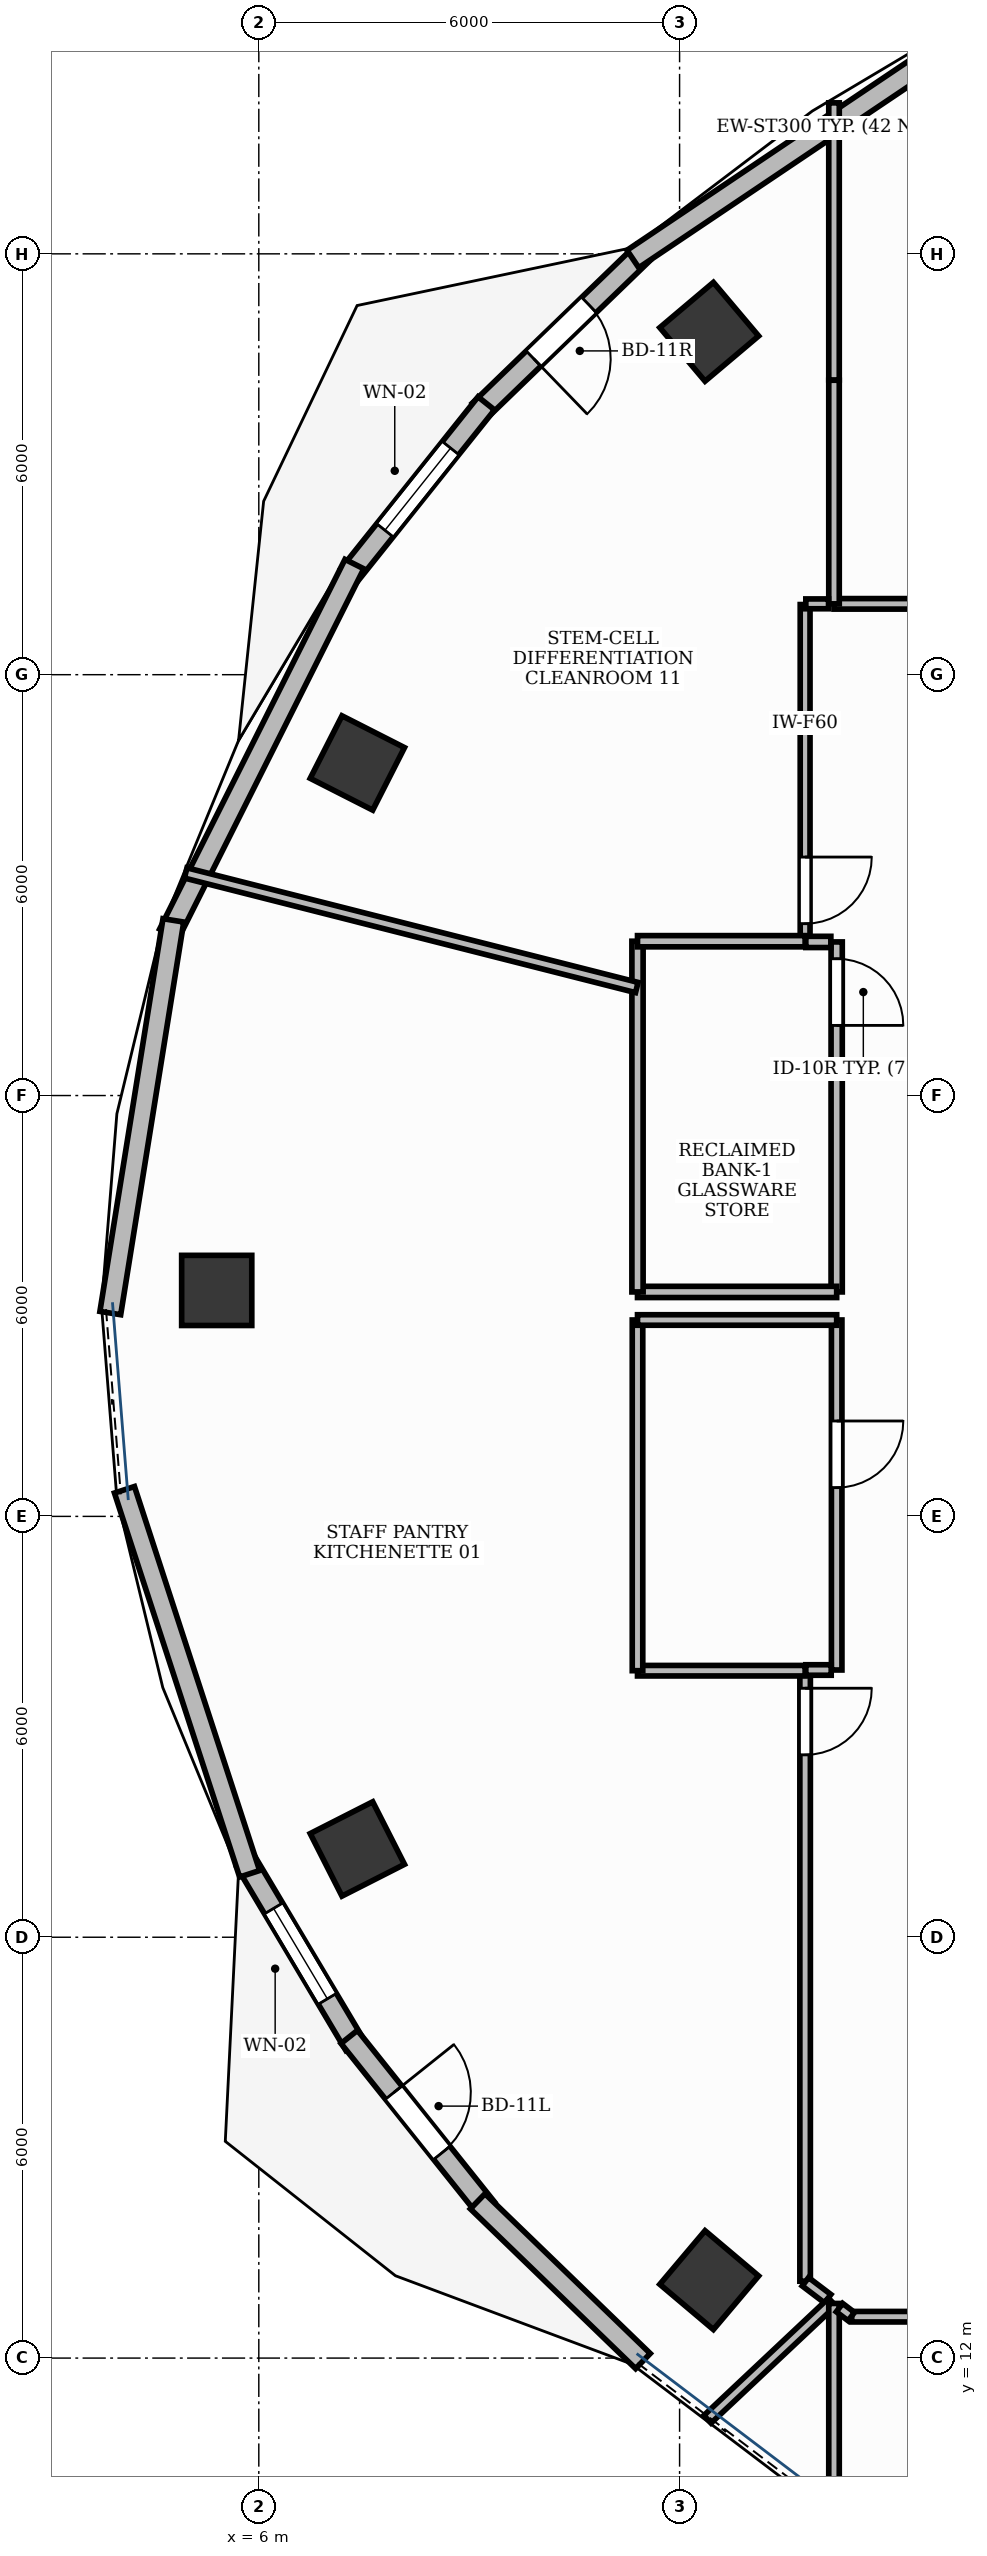
"""IFC4 building model, lengths in metres.
Left out: names, types, materials, properties, quantities, classifications, styles, units other than length and angle.
Written with IfcOpenShell. Run it as: python <this file> out.ifc"""

import sys

from ifc_helpers import new_model, si_unit, direction, frame, frame_2d, origin, origin_2d, place, context, subcontext, project, spatial, rectangle, extrude, element, fill, save


model = new_model("IFC4")
c1 = context("Model", 3, precision=1e-05, world=origin(), true_north=direction((0.0, 1.0)))
c2 = subcontext(c1, "Body", "Model", "MODEL_VIEW")
j1 = project(units=[si_unit("LENGTHUNIT", "METRE"), si_unit("PLANEANGLEUNIT", "RADIAN")], contexts=[c1])
p1 = place(None, origin())
s1 = spatial("IfcSite", under=j1, at=p1, CompositionType="ELEMENT")
p2 = place(p1, origin())
s2 = spatial("IfcBuilding", under=s1, at=p2, CompositionType="ELEMENT")
p3 = place(p2, frame((0.0, 0.0, 235.2)))
s3 = spatial("IfcBuildingStorey", under=s2, at=p3, CompositionType="ELEMENT", Elevation=235.2)
for number, where, z_axis, x_axis in (
    (1, (12.423, 40.889, -0.0), (0.0, 0.0, 1.0), (0.764, 0.645, 0.0)),
    (2, (7.405, 34.741, -0.0), (0.0, 0.0, 1.0), (0.453, 0.891, 0.0)),
    (3, (5.4, 27.222, -0.0), (0.0, 0.0, 1.0), (0.0, 1.0, 0.0)),
    (4, (7.405, 19.259, -0.0), (0.0, 0.0, 1.0), (-0.453, 0.891, 0.0)),
    (5, (12.423, 13.111, -0.0), (0.0, 0.0, 1.0), (-0.764, 0.645, 0.0)),
):
    element("IfcColumn", number, at=place(p3, frame(where, z_axis=z_axis, x_axis=x_axis)), inside=s3, PredefinedType="COLUMN", context=c2, shape_type="SweptSolid", body=[
        extrude(rectangle(XDim=1.0, YDim=1.0, at=origin_2d()), origin(), (0.0, 0.0, 1.0), 3.901),
    ])
p4 = place(p3, frame((11.477, 42.014, 0.0), z_axis=(0.0, 0.0, 1.0), x_axis=(-0.718959481813, -0.695051986194, 0.0)))
e6 = element("IfcWall", 6, at=p4, inside=s3, PredefinedType="STANDARD", context=c2, shape_type="SweptSolid", body=[
    extrude(rectangle(XDim=3.237, YDim=0.3, at=frame_2d((1.619, 0.0))), origin(), (0.0, 0.0, 1.0), 3.9),
])
p5 = place(p4, frame((1.069, 0.0, 0.0)))
e7 = element("IfcOpeningElement", 7, at=p5, cuts=e6, PredefinedType="OPENING", context=c2, shape_type="SweptSolid", body=[
    extrude(rectangle(XDim=1.1, YDim=2.15, at=frame_2d((0.55, 1.075))), frame((0.0, 0.165, 0.0), z_axis=(0.0, -1.0, 0.0), x_axis=(1.0, 0.0, 0.0)), (0.0, 0.0, 1.0), 0.33),
])
p6 = place(p3, frame((9.244, 39.868, 0.0), z_axis=(0.0, 0.0, 1.0), x_axis=(-0.624095877763, -0.781347768512, 0.0)))
e8 = element("IfcWall", 8, at=p6, inside=s3, PredefinedType="STANDARD", context=c2, shape_type="SweptSolid", body=[
    extrude(rectangle(XDim=3.132, YDim=0.3, at=frame_2d((1.566, 0.0))), origin(), (0.0, 0.0, 1.0), 3.9),
])
p7 = place(p6, frame((0.816, 0.0, 0.95)))
e9 = element("IfcOpeningElement", 9, at=p7, cuts=e8, PredefinedType="OPENING", context=c2, shape_type="SweptSolid", body=[
    extrude(rectangle(XDim=1.5, YDim=1.8, at=frame_2d((0.75, 0.9))), frame((0.0, 0.165, 0.0), z_axis=(0.0, -1.0, 0.0), x_axis=(1.0, 0.0, 0.0)), (0.0, 0.0, 1.0), 0.33),
])
p8 = place(p3, frame((5.818, 19.071, 0.0), z_axis=(0.0, 0.0, 1.0), x_axis=(0.511263271049, -0.859424148879, 0.0)))
e10 = element("IfcWall", 10, at=p8, inside=s3, PredefinedType="STANDARD", context=c2, shape_type="SweptSolid", body=[
    extrude(rectangle(XDim=3.036, YDim=0.3, at=frame_2d((1.518, 0.0))), origin(), (0.0, 0.0, 1.0), 3.9),
])
p9 = place(p8, frame((0.768, 0.0, 0.95)))
e11 = element("IfcOpeningElement", 11, at=p9, cuts=e10, PredefinedType="OPENING", context=c2, shape_type="SweptSolid", body=[
    extrude(rectangle(XDim=1.5, YDim=1.8, at=frame_2d((0.75, 0.9))), frame((0.0, 0.165, 0.0), z_axis=(0.0, -1.0, 0.0), x_axis=(1.0, 0.0, 0.0)), (0.0, 0.0, 1.0), 0.33),
])
p10 = place(p3, frame((7.29, 16.579, 0.0), z_axis=(0.0, 0.0, 1.0), x_axis=(0.624095877763, -0.781347768512, 0.0)))
e12 = element("IfcWall", 12, at=p10, inside=s3, PredefinedType="STANDARD", context=c2, shape_type="SweptSolid", body=[
    extrude(rectangle(XDim=3.132, YDim=0.3, at=frame_2d((1.566, 0.0))), origin(), (0.0, 0.0, 1.0), 3.9),
])
p11 = place(p10, frame((1.016, 0.0, 0.0)))
e13 = element("IfcOpeningElement", 13, at=p11, cuts=e12, PredefinedType="OPENING", context=c2, shape_type="SweptSolid", body=[
    extrude(rectangle(XDim=1.1, YDim=2.15, at=frame_2d((0.55, 1.075))), frame((0.0, 0.165, 0.0), z_axis=(0.0, -1.0, 0.0), x_axis=(1.0, 0.0, 0.0)), (0.0, 0.0, 1.0), 0.33),
])
p12 = place(p3, frame((16.9, 45.667, 0.0), z_axis=(0.0, 0.0, 1.0), x_axis=(-0.829994558021, -0.557771488743, 0.0)))
e14 = element("IfcWall", 14, at=p12, inside=s3, PredefinedType="STANDARD", context=c2, shape_type="SweptSolid", body=[
    extrude(rectangle(XDim=6.706, YDim=0.3, at=frame_2d((3.353, 0.0))), origin(), (0.0, 0.0, 1.0), 3.9),
])
p13 = place(p3, frame((7.363, 37.577, 0.0), z_axis=(0.0, 0.0, 1.0), x_axis=(-0.448240215972, -0.893913143871, 0.0)))
e15 = element("IfcWall", 15, at=p13, inside=s3, PredefinedType="STANDARD", context=c2, shape_type="SweptSolid", body=[
    extrude(rectangle(XDim=5.896, YDim=0.3, at=frame_2d((2.948, 0.0))), origin(), (0.0, 0.0, 1.0), 3.47),
])
p14 = place(p3, frame((4.782, 32.497, 0.0), z_axis=(0.0, 0.0, 1.0), x_axis=(-0.158573166105, -0.987347229191, 0.0)))
e16 = element("IfcWall", 16, at=p14, inside=s3, PredefinedType="STANDARD", context=c2, shape_type="SweptSolid", body=[
    extrude(rectangle(XDim=5.67, YDim=0.3, at=frame_2d((2.835, 0.0))), origin(), (0.0, 0.0, 1.0), 3.47),
])
p15 = place(p3, frame((4.084, 24.379, 0.0), z_axis=(0.0, 0.0, 1.0), x_axis=(0.309937285623, -0.95075700312, 0.0)))
e17 = element("IfcWall", 17, at=p15, inside=s3, PredefinedType="STANDARD", context=c2, shape_type="SweptSolid", body=[
    extrude(rectangle(XDim=5.758, YDim=0.3, at=frame_2d((2.879, 0.0))), origin(), (0.0, 0.0, 1.0), 3.9),
])
p16 = place(p3, frame((9.121, 14.235, 0.0), z_axis=(0.0, 0.0, 1.0), x_axis=(0.718999544538, -0.695010543052, 0.0)))
e18 = element("IfcWall", 18, at=p16, inside=s3, PredefinedType="STANDARD", context=c2, shape_type="SweptSolid", body=[
    extrude(rectangle(XDim=3.277, YDim=0.3, at=frame_2d((1.639, 0.0))), origin(), (0.0, 0.0, 1.0), 3.9),
])
p17 = place(p3, frame((14.24, 26.8, 0.0), z_axis=(0.0, 0.0, 1.0), x_axis=(0.0, -1.0, 0.0)))
e19 = element("IfcWall", 19, at=p17, inside=s3, PredefinedType="PARTITIONING", context=c2, shape_type="SweptSolid", body=[
    extrude(rectangle(XDim=4.99, YDim=0.15, at=frame_2d((2.495, 0.0))), origin(), (0.0, 0.0, 1.0), 2.91),
])
p18 = place(p17, frame((1.44, 0.0, 0.0)))
e20 = element("IfcOpeningElement", 20, at=p18, cuts=e19, PredefinedType="OPENING", context=c2, shape_type="SweptSolid", body=[
    extrude(rectangle(XDim=0.95, YDim=2.15, at=frame_2d((0.475, 1.075))), frame((0.0, 0.09, 0.0), z_axis=(0.0, -1.0, 0.0), x_axis=(1.0, 0.0, 0.0)), (0.0, 0.0, 1.0), 0.18),
])
p19 = place(p3, frame((14.24, 32.19, 0.0), z_axis=(0.0, 0.0, 1.0), x_axis=(0.0, -1.0, 0.0)))
e21 = element("IfcWall", 21, at=p19, inside=s3, PredefinedType="PARTITIONING", context=c2, shape_type="SweptSolid", body=[
    extrude(rectangle(XDim=4.99, YDim=0.16, at=frame_2d((2.495, 0.0))), origin(), (0.0, 0.0, 1.0), 2.91),
])
p20 = place(p19, frame((0.24, 0.0, 0.0)))
e22 = element("IfcOpeningElement", 22, at=p20, cuts=e21, PredefinedType="OPENING", context=c2, shape_type="SweptSolid", body=[
    extrude(rectangle(XDim=0.95, YDim=2.15, at=frame_2d((0.475, 1.075))), frame((0.0, 0.095, 0.0), z_axis=(0.0, -1.0, 0.0), x_axis=(1.0, 0.0, 0.0)), (0.0, 0.0, 1.0), 0.19),
])
p21 = place(p3, frame((13.79, 21.79, 0.0), z_axis=(0.0, 0.0, 1.0), x_axis=(0.0, -1.0, 0.0)))
e23 = element("IfcWall", 23, at=p21, inside=s3, PredefinedType="PARTITIONING", context=c2, shape_type="SweptSolid", body=[
    extrude(rectangle(XDim=8.694, YDim=0.15, at=frame_2d((4.347, 0.0))), origin(), (0.0, 0.0, 1.0), 2.91),
])
p22 = place(p21, frame((0.24, 0.0, 0.0)))
e24 = element("IfcOpeningElement", 24, at=p22, cuts=e23, PredefinedType="OPENING", context=c2, shape_type="SweptSolid", body=[
    extrude(rectangle(XDim=0.95, YDim=2.15, at=frame_2d((0.475, 1.075))), frame((0.0, 0.09, 0.0), z_axis=(0.0, -1.0, 0.0), x_axis=(1.0, 0.0, 0.0)), (0.0, 0.0, 1.0), 0.18),
])
p23 = place(p3, frame((14.454, 12.59, 0.0), z_axis=(0.0, 0.0, 1.0), x_axis=(1.0, 0.0, 0.0)))
e25 = element("IfcWall", 25, at=p23, inside=s3, PredefinedType="PARTITIONING", context=c2, shape_type="SweptSolid", body=[
    extrude(rectangle(XDim=12.652, YDim=0.15, at=frame_2d((6.326, 0.0))), origin(), (0.0, 0.0, 1.0), 2.91),
])
p24 = place(p23, frame((1.673, 0.0, 0.0)))
e26 = element("IfcOpeningElement", 26, at=p24, cuts=e25, PredefinedType="OPENING", context=c2, shape_type="SweptSolid", body=[
    extrude(rectangle(XDim=0.95, YDim=2.15, at=frame_2d((0.475, 1.075))), frame((0.0, 0.09, 0.0), z_axis=(0.0, -1.0, 0.0), x_axis=(1.0, 0.0, 0.0)), (0.0, 0.0, 1.0), 0.18),
])
p25 = place(p3, frame((13.79, 37.0, 0.0), z_axis=(0.0, 0.0, 1.0), x_axis=(0.0, -1.0, 0.0)))
e27 = element("IfcWall", 27, at=p25, inside=s3, PredefinedType="PARTITIONING", context=c2, shape_type="SweptSolid", body=[
    extrude(rectangle(XDim=4.79, YDim=0.14, at=frame_2d((2.395, 0.0))), origin(), (0.0, 0.0, 1.0), 2.91),
])
p26 = place(p25, frame((3.6, 0.0, 0.0)))
e28 = element("IfcOpeningElement", 28, at=p26, cuts=e27, PredefinedType="OPENING", context=c2, shape_type="SweptSolid", body=[
    extrude(rectangle(XDim=0.95, YDim=2.15, at=frame_2d((0.475, 1.075))), frame((0.0, 0.085, 0.0), z_axis=(0.0, -1.0, 0.0), x_axis=(1.0, 0.0, 0.0)), (0.0, 0.0, 1.0), 0.17),
])
p27 = place(p3, frame((14.162, 21.81, 0.0), z_axis=(0.0, 0.0, 1.0), x_axis=(-1.0, 0.0, 0.0)))
e29 = element("IfcWall", 29, at=p27, inside=s3, PredefinedType="PARTITIONING", context=c2, shape_type="SweptSolid", body=[
    extrude(rectangle(XDim=0.362, YDim=0.15, at=frame_2d((0.181, 0.0))), origin(), (0.0, 0.0, 1.0), 2.91),
])
p28 = place(p3, frame((13.79, 21.8, 0.0), z_axis=(0.0, 0.0, 1.0), x_axis=(-1.0, 0.0, 0.0)))
e30 = element("IfcWall", 30, at=p28, inside=s3, PredefinedType="PARTITIONING", context=c2, shape_type="SweptSolid", body=[
    extrude(rectangle(XDim=2.39, YDim=0.15, at=frame_2d((1.195, 0.0))), origin(), (0.0, 0.0, 1.0), 2.91),
])
p29 = place(p3, frame((11.4, 21.8, 0.0), z_axis=(0.0, 0.0, 1.0), x_axis=(0.0, 1.0, 0.0)))
e31 = element("IfcWall", 31, at=p29, inside=s3, PredefinedType="PARTITIONING", context=c2, shape_type="SweptSolid", body=[
    extrude(rectangle(XDim=5.0, YDim=0.15, at=frame_2d((2.5, 0.0))), origin(), (0.0, 0.0, 1.0), 2.91),
])
p30 = place(p3, frame((11.4, 26.8, 0.0), z_axis=(0.0, 0.0, 1.0), x_axis=(1.0, 0.0, 0.0)))
e32 = element("IfcWall", 32, at=p30, inside=s3, PredefinedType="PARTITIONING", context=c2, shape_type="SweptSolid", body=[
    extrude(rectangle(XDim=2.84, YDim=0.15, at=frame_2d((1.42, 0.0))), origin(), (0.0, 0.0, 1.0), 2.91),
])
p31 = place(p3, frame((13.8, 32.19, 0.0), z_axis=(0.0, 0.0, 1.0), x_axis=(1.0, 0.0, 0.0)))
e33 = element("IfcWall", 33, at=p31, inside=s3, PredefinedType="PARTITIONING", context=c2, shape_type="SweptSolid", body=[
    extrude(rectangle(XDim=0.357, YDim=0.16, at=frame_2d((0.178, 0.0))), origin(), (0.0, 0.0, 1.0), 2.91),
])
p32 = place(p3, frame((14.24, 27.2, 0.0), z_axis=(0.0, 0.0, 1.0), x_axis=(-1.0, 0.0, 0.0)))
e34 = element("IfcWall", 34, at=p32, inside=s3, PredefinedType="PARTITIONING", context=c2, shape_type="SweptSolid", body=[
    extrude(rectangle(XDim=2.84, YDim=0.16, at=frame_2d((1.42, 0.0))), origin(), (0.0, 0.0, 1.0), 2.91),
])
p33 = place(p3, frame((11.4, 27.2, 0.0), z_axis=(0.0, 0.0, 1.0), x_axis=(0.0, 1.0, 0.0)))
e35 = element("IfcWall", 35, at=p33, inside=s3, PredefinedType="PARTITIONING", context=c2, shape_type="SweptSolid", body=[
    extrude(rectangle(XDim=5.0, YDim=0.16, at=frame_2d((2.5, 0.0))), origin(), (0.0, 0.0, 1.0), 2.91),
])
p34 = place(p3, frame((11.4, 32.2, 0.0), z_axis=(0.0, 0.0, 1.0), x_axis=(1.0, 0.0, 0.0)))
e36 = element("IfcWall", 36, at=p34, inside=s3, PredefinedType="PARTITIONING", context=c2, shape_type="SweptSolid", body=[
    extrude(rectangle(XDim=2.39, YDim=0.16, at=frame_2d((1.195, 0.0))), origin(), (0.0, 0.0, 1.0), 2.91),
])
p35 = place(p3, frame((4.958, 33.173, 0.0), z_axis=(0.0, 0.0, 1.0), x_axis=(0.969250966663, -0.246074305083, 0.0)))
e37 = element("IfcWall", 37, at=p35, inside=s3, PredefinedType="PARTITIONING", context=c2, shape_type="SweptSolid", body=[
    extrude(rectangle(XDim=6.636, YDim=0.15, at=frame_2d((3.318, 0.0))), origin(), (0.0, 0.0, 1.0), 2.91),
])
p36 = place(p3, frame((13.794, 13.088, 0.0), z_axis=(0.0, 0.0, 1.0), x_axis=(0.797056485175, -0.60390476024, 0.0)))
e38 = element("IfcWall", 38, at=p36, inside=s3, PredefinedType="PARTITIONING", context=c2, shape_type="SweptSolid", body=[
    extrude(rectangle(XDim=0.399, YDim=0.15, at=frame_2d((0.2, 0.0))), origin(), (0.0, 0.0, 1.0), 2.91),
])
p37 = place(p3, frame((14.175, 12.799, 0.0), z_axis=(0.0, 0.0, 1.0), x_axis=(-0.728528819482, -0.685015152521, 0.0)))
e39 = element("IfcWall", 39, at=p37, inside=s3, PredefinedType="PARTITIONING", context=c2, shape_type="SweptSolid", body=[
    extrude(rectangle(XDim=2.441, YDim=0.15, at=frame_2d((1.22, 0.0))), origin(), (0.0, 0.0, 1.0), 2.91),
])
p38 = place(p3, frame((14.202, 9.847, 0.0), z_axis=(0.0, 0.0, 1.0), x_axis=(0.0, 1.0, 0.0)))
e40 = element("IfcWall", 40, at=p38, inside=s3, PredefinedType="PARTITIONING", context=c2, shape_type="SweptSolid", body=[
    extrude(rectangle(XDim=2.931, YDim=0.15, at=frame_2d((1.466, 0.0))), origin(), (0.0, 0.0, 1.0), 2.91),
])
p39 = place(p3, frame((14.28, 12.72, 0.0), z_axis=(0.0, 0.0, 1.0), x_axis=(0.796940505815, -0.604057803683, 0.0)))
e41 = element("IfcWall", 41, at=p39, inside=s3, PredefinedType="PARTITIONING", context=c2, shape_type="SweptSolid", body=[
    extrude(rectangle(XDim=0.211, YDim=0.15, at=frame_2d((0.106, 0.0))), origin(), (0.0, 0.0, 1.0), 2.91),
])
p40 = place(p3, frame((17.6, 37.01, 0.0), z_axis=(0.0, 0.0, 1.0), x_axis=(-1.0, 0.0, 0.0)))
e42 = element("IfcWall", 42, at=p40, inside=s3, PredefinedType="PARTITIONING", context=c2, shape_type="SweptSolid", body=[
    extrude(rectangle(XDim=3.398, YDim=0.15, at=frame_2d((1.699, 0.0))), origin(), (0.0, 0.0, 1.0), 2.91),
])
p41 = place(p3, frame((14.202, 37.01, 0.0), z_axis=(0.0, 0.0, 1.0), x_axis=(0.0, 1.0, 0.0)))
e43 = element("IfcWall", 43, at=p41, inside=s3, PredefinedType="PARTITIONING", context=c2, shape_type="SweptSolid", body=[
    extrude(rectangle(XDim=3.188, YDim=0.15, at=frame_2d((1.594, 0.0))), origin(), (0.0, 0.0, 1.0), 2.91),
])
p42 = place(p3, frame((14.202, 40.202, 0.0), z_axis=(0.0, 0.0, 1.0), x_axis=(0.0, 1.0, 0.0)))
e44 = element("IfcWall", 44, at=p42, inside=s3, PredefinedType="PARTITIONING", context=c2, shape_type="SweptSolid", body=[
    extrude(rectangle(XDim=3.95, YDim=0.15, at=frame_2d((1.975, 0.0))), origin(), (0.0, 0.0, 1.0), 2.91),
])
p43 = place(p3, frame((14.124, 37.01, 0.0), z_axis=(0.0, 0.0, 1.0), x_axis=(-1.0, 0.0, 0.0)))
e45 = element("IfcWall", 45, at=p43, inside=s3, PredefinedType="PARTITIONING", context=c2, shape_type="SweptSolid", body=[
    extrude(rectangle(XDim=0.324, YDim=0.14, at=frame_2d((0.162, 0.0))), origin(), (0.0, 0.0, 1.0), 2.91),
])
p44 = place(p5, origin())
e46 = element("IfcDoor", 46, at=p44, inside=s3, OperationType="SINGLE_SWING_RIGHT", PredefinedType="DOOR", context=c2, shape_type="SweptSolid", body=[
    extrude(rectangle(XDim=1.1, YDim=2.15, at=frame_2d((0.55, 1.075))), frame((0.0, 0.025, 0.0), z_axis=(0.0, -1.0, 0.0), x_axis=(1.0, 0.0, 0.0)), (0.0, 0.0, 1.0), 0.05),
])
fill(e7, e46)
p45 = place(p7, origin())
e47 = element("IfcWindow", 47, at=p45, inside=s3, PartitioningType="DOUBLE_PANEL_VERTICAL", PredefinedType="WINDOW", context=c2, shape_type="SweptSolid", body=[
    extrude(rectangle(XDim=1.5, YDim=1.8, at=frame_2d((0.75, 0.9))), frame((0.0, 0.03, 0.0), z_axis=(0.0, -1.0, 0.0), x_axis=(1.0, 0.0, 0.0)), (0.0, 0.0, 1.0), 0.06),
])
fill(e9, e47)
p46 = place(p9, origin())
e48 = element("IfcWindow", 48, at=p46, inside=s3, PartitioningType="DOUBLE_PANEL_VERTICAL", PredefinedType="WINDOW", context=c2, shape_type="SweptSolid", body=[
    extrude(rectangle(XDim=1.5, YDim=1.8, at=frame_2d((0.75, 0.9))), frame((0.0, 0.03, 0.0), z_axis=(0.0, -1.0, 0.0), x_axis=(1.0, 0.0, 0.0)), (0.0, 0.0, 1.0), 0.06),
])
fill(e11, e48)
p47 = place(p11, origin())
e49 = element("IfcDoor", 49, at=p47, inside=s3, OperationType="SINGLE_SWING_LEFT", PredefinedType="DOOR", context=c2, shape_type="SweptSolid", body=[
    extrude(rectangle(XDim=1.1, YDim=2.15, at=frame_2d((0.55, 1.075))), frame((0.0, 0.025, 0.0), z_axis=(0.0, -1.0, 0.0), x_axis=(1.0, 0.0, 0.0)), (0.0, 0.0, 1.0), 0.05),
])
fill(e13, e49)
p48 = place(p18, origin())
e50 = element("IfcDoor", 50, at=p48, inside=s3, OperationType="SINGLE_SWING_LEFT", PredefinedType="DOOR", context=c2, shape_type="SweptSolid", body=[
    extrude(rectangle(XDim=0.95, YDim=2.15, at=frame_2d((0.475, 1.075))), frame((0.0, 0.025, 0.0), z_axis=(0.0, -1.0, 0.0), x_axis=(1.0, 0.0, 0.0)), (0.0, 0.0, 1.0), 0.05),
])
fill(e20, e50)
p49 = place(p20, origin())
e51 = element("IfcDoor", 51, at=p49, inside=s3, OperationType="SINGLE_SWING_RIGHT", PredefinedType="DOOR", context=c2, shape_type="SweptSolid", body=[
    extrude(rectangle(XDim=0.95, YDim=2.15, at=frame_2d((0.475, 1.075))), frame((0.0, 0.025, 0.0), z_axis=(0.0, -1.0, 0.0), x_axis=(1.0, 0.0, 0.0)), (0.0, 0.0, 1.0), 0.05),
])
fill(e22, e51)
p50 = place(p22, origin())
e52 = element("IfcDoor", 52, at=p50, inside=s3, OperationType="SINGLE_SWING_LEFT", PredefinedType="DOOR", context=c2, shape_type="SweptSolid", body=[
    extrude(rectangle(XDim=0.95, YDim=2.15, at=frame_2d((0.475, 1.075))), frame((0.0, 0.025, 0.0), z_axis=(0.0, -1.0, 0.0), x_axis=(1.0, 0.0, 0.0)), (0.0, 0.0, 1.0), 0.05),
])
fill(e24, e52)
p51 = place(p26, origin())
e53 = element("IfcDoor", 53, at=p51, inside=s3, OperationType="SINGLE_SWING_LEFT", PredefinedType="DOOR", context=c2, shape_type="SweptSolid", body=[
    extrude(rectangle(XDim=0.95, YDim=2.15, at=frame_2d((0.475, 1.075))), frame((0.0, 0.025, 0.0), z_axis=(0.0, -1.0, 0.0), x_axis=(1.0, 0.0, 0.0)), (0.0, 0.0, 1.0), 0.05),
])
fill(e28, e53)
save(model, sys.argv[1])
